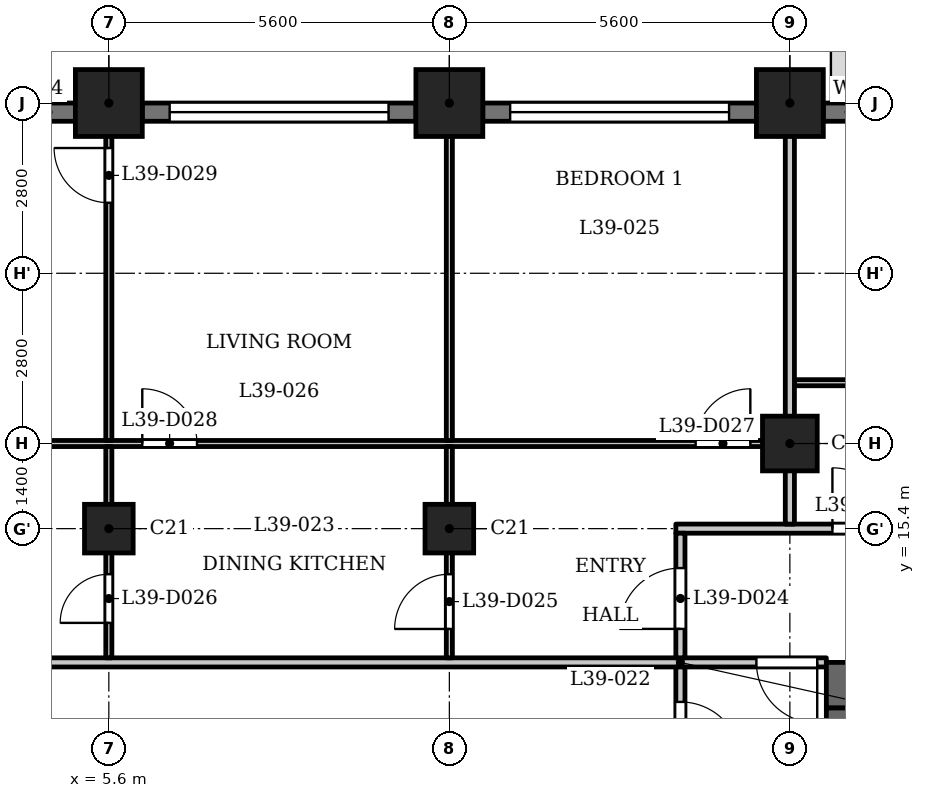
"""IFC4 building model, lengths in metres.
Left out: names, types, materials, properties, quantities, classifications, styles, units other than length and angle.
Written with IfcOpenShell. Run it as: python <this file> out.ifc"""

import sys

from ifc_helpers import new_model, si_unit, direction, frame, frame_2d, origin, origin_2d, place, context, subcontext, project, spatial, rectangle, extrude, element, fill, save


model = new_model("IFC4")
c1 = context("Model", 3, precision=1e-05, world=origin(), true_north=direction((0.0, 1.0)))
c2 = subcontext(c1, "Body", "Model", "MODEL_VIEW")
j1 = project(units=[si_unit("LENGTHUNIT", "METRE"), si_unit("PLANEANGLEUNIT", "RADIAN")], contexts=[c1])
p1 = place(None, origin())
s1 = spatial("IfcSite", under=j1, at=p1, CompositionType="ELEMENT")
p2 = place(p1, origin())
s2 = spatial("IfcBuilding", under=s1, at=p2, CompositionType="ELEMENT")
p3 = place(p2, frame((0.0, 0.0, 153.6)))
s3 = spatial("IfcBuildingStorey", under=s2, at=p3, CompositionType="ELEMENT", Elevation=153.6)
for number, where, z_axis, x_axis in (
    (1, (16.8, 22.4, 0.0), (0.0, 0.0, 1.0), (1.0, 0.0, 0.0)),
    (2, (11.2, 22.4, 0.0), (0.0, 0.0, 1.0), (1.0, 0.0, 0.0)),
    (3, (5.6, 22.4, 0.0), (0.0, 0.0, 1.0), (1.0, 0.0, 0.0)),
):
    element("IfcColumn", number, at=place(p3, frame(where, z_axis=z_axis, x_axis=x_axis)), inside=s3, PredefinedType="COLUMN", context=c2, shape_type="SweptSolid", body=[
        extrude(rectangle(XDim=1.1, YDim=1.1, at=origin_2d()), origin(), (0.0, 0.0, 1.0), 3.5),
    ])
p4 = place(p3, frame((16.8, 16.8, 0.0), z_axis=(0.0, 0.0, 1.0), x_axis=(1.0, 0.0, 0.0)))
e4 = element("IfcColumn", 4, at=p4, inside=s3, PredefinedType="COLUMN", context=c2, shape_type="SweptSolid", body=[
    extrude(rectangle(XDim=0.9, YDim=0.9, at=origin_2d()), origin(), (0.0, 0.0, 1.0), 3.5),
])
for number, where, z_axis, x_axis in (
    (5, (5.6, 15.4, 0.0), (0.0, 0.0, 1.0), (1.0, 0.0, 0.0)),
    (6, (11.2, 15.4, 0.0), (0.0, 0.0, 1.0), (1.0, 0.0, 0.0)),
):
    element("IfcColumn", number, at=place(p3, frame(where, z_axis=z_axis, x_axis=x_axis)), inside=s3, PredefinedType="COLUMN", context=c2, shape_type="SweptSolid", body=[
        extrude(rectangle(XDim=0.8, YDim=0.8, at=origin_2d()), origin(), (0.0, 0.0, 1.0), 3.5),
    ])
p5 = place(p3, frame((20.0, 22.25, 0.0), z_axis=(0.0, 0.0, 1.0), x_axis=(-1.0, 0.0, 0.0)))
e7 = element("IfcWall", 7, at=p5, inside=s3, PredefinedType="SOLIDWALL", context=c2, shape_type="SweptSolid", body=[
    extrude(rectangle(XDim=2.65, YDim=0.3, at=frame_2d((1.325, 0.0))), origin(), (0.0, 0.0, 1.0), 2.45),
])
p6 = place(p5, frame((0.425, 0.0, 0.9)))
e8 = element("IfcOpeningElement", 8, at=p6, cuts=e7, PredefinedType="OPENING", context=c2, shape_type="SweptSolid", body=[
    extrude(rectangle(XDim=1.8, YDim=1.25, at=frame_2d((0.9, 0.625))), frame((0.0, 0.16, 0.0), z_axis=(0.0, -1.0, 0.0), x_axis=(1.0, 0.0, 0.0)), (0.0, 0.0, 1.0), 0.32),
])
p7 = place(p3, frame((16.25, 22.25, 0.0), z_axis=(0.0, 0.0, 1.0), x_axis=(-1.0, 0.0, 0.0)))
e9 = element("IfcWall", 9, at=p7, inside=s3, PredefinedType="SOLIDWALL", context=c2, shape_type="SweptSolid", body=[
    extrude(rectangle(XDim=4.5, YDim=0.3, at=frame_2d((2.25, 0.0))), origin(), (0.0, 0.0, 1.0), 2.45),
])
p8 = place(p7, frame((0.45, 0.0, 1.2)))
e10 = element("IfcOpeningElement", 10, at=p8, cuts=e9, PredefinedType="OPENING", context=c2, shape_type="SweptSolid", body=[
    extrude(rectangle(XDim=3.6, YDim=0.95, at=frame_2d((1.8, 0.475))), frame((0.0, 0.16, 0.0), z_axis=(0.0, -1.0, 0.0), x_axis=(1.0, 0.0, 0.0)), (0.0, 0.0, 1.0), 0.32),
])
p9 = place(p3, frame((10.65, 22.25, 0.0), z_axis=(0.0, 0.0, 1.0), x_axis=(-1.0, 0.0, 0.0)))
e11 = element("IfcWall", 11, at=p9, inside=s3, PredefinedType="SOLIDWALL", context=c2, shape_type="SweptSolid", body=[
    extrude(rectangle(XDim=4.5, YDim=0.3, at=frame_2d((2.25, 0.0))), origin(), (0.0, 0.0, 1.0), 2.45),
])
p10 = place(p9, frame((0.45, 0.0, 1.2)))
e12 = element("IfcOpeningElement", 12, at=p10, cuts=e11, PredefinedType="OPENING", context=c2, shape_type="SweptSolid", body=[
    extrude(rectangle(XDim=3.6, YDim=0.95, at=frame_2d((1.8, 0.475))), frame((0.0, 0.16, 0.0), z_axis=(0.0, -1.0, 0.0), x_axis=(1.0, 0.0, 0.0)), (0.0, 0.0, 1.0), 0.32),
])
p11 = place(p3, frame((5.05, 22.25, 0.0), z_axis=(0.0, 0.0, 1.0), x_axis=(-1.0, 0.0, 0.0)))
e13 = element("IfcWall", 13, at=p11, inside=s3, PredefinedType="SOLIDWALL", context=c2, shape_type="SweptSolid", body=[
    extrude(rectangle(XDim=4.5, YDim=0.3, at=frame_2d((2.25, 0.0))), origin(), (0.0, 0.0, 1.0), 2.45),
])
p12 = place(p11, frame((0.45, 0.0, 1.2)))
e14 = element("IfcOpeningElement", 14, at=p12, cuts=e13, PredefinedType="OPENING", context=c2, shape_type="SweptSolid", body=[
    extrude(rectangle(XDim=3.6, YDim=0.95, at=frame_2d((1.8, 0.475))), frame((0.0, 0.16, 0.0), z_axis=(0.0, -1.0, 0.0), x_axis=(1.0, 0.0, 0.0)), (0.0, 0.0, 1.0), 0.32),
])
p13 = place(p3, frame((17.4, 12.825, 0.0), z_axis=(0.0, 0.0, 1.0), x_axis=(1.0, 0.0, 0.0)))
e15 = element("IfcWall", 15, at=p13, inside=s3, PredefinedType="SHEAR", context=c2, shape_type="SweptSolid", body=[
    extrude(rectangle(XDim=10.4, YDim=0.75, at=frame_2d((5.2, 0.0))), origin(), (0.0, 0.0, 1.0), 3.2),
])
p14 = place(p3, frame((17.6, -12.45, 0.0), z_axis=(0.0, 0.0, 1.0), x_axis=(0.0, 1.0, 0.0)))
e16 = element("IfcWall", 16, at=p14, inside=s3, PredefinedType="SHEAR", context=c2, shape_type="SweptSolid", body=[
    extrude(rectangle(XDim=24.9, YDim=0.4, at=frame_2d((12.45, 0.0))), origin(), (0.0, 0.0, 1.0), 3.2),
])
p15 = place(p14, frame((6.325, 0.0, 0.0)))
e17 = element("IfcOpeningElement", 17, at=p15, cuts=e16, PredefinedType="OPENING", context=c2, shape_type="SweptSolid", body=[
    extrude(rectangle(XDim=0.9, YDim=2.1, at=frame_2d((0.45, 1.05))), frame((0.0, 0.21, 0.0), z_axis=(0.0, -1.0, 0.0), x_axis=(1.0, 0.0, 0.0)), (0.0, 0.0, 1.0), 0.42),
])
p16 = place(p14, frame((9.925, 0.0, 0.0)))
e18 = element("IfcOpeningElement", 18, at=p16, cuts=e16, PredefinedType="OPENING", context=c2, shape_type="SweptSolid", body=[
    extrude(rectangle(XDim=0.9, YDim=2.1, at=frame_2d((0.45, 1.05))), frame((0.0, 0.21, 0.0), z_axis=(0.0, -1.0, 0.0), x_axis=(1.0, 0.0, 0.0)), (0.0, 0.0, 1.0), 0.42),
])
p17 = place(p14, frame((15.6, 0.0, 0.0)))
e19 = element("IfcOpeningElement", 19, at=p17, cuts=e16, PredefinedType="OPENING", context=c2, shape_type="SweptSolid", body=[
    extrude(rectangle(XDim=1.1, YDim=2.1, at=frame_2d((0.55, 1.05))), frame((0.0, 0.21, 0.0), z_axis=(0.0, -1.0, 0.0), x_axis=(1.0, 0.0, 0.0)), (0.0, 0.0, 1.0), 0.42),
])
p18 = place(p14, frame((18.0, 0.0, 0.0)))
e20 = element("IfcOpeningElement", 20, at=p18, cuts=e16, PredefinedType="OPENING", context=c2, shape_type="SweptSolid", body=[
    extrude(rectangle(XDim=1.1, YDim=2.1, at=frame_2d((0.55, 1.05))), frame((0.0, 0.21, 0.0), z_axis=(0.0, -1.0, 0.0), x_axis=(1.0, 0.0, 0.0)), (0.0, 0.0, 1.0), 0.42),
])
p19 = place(p14, frame((23.025, 0.0, 0.0)))
e21 = element("IfcOpeningElement", 21, at=p19, cuts=e16, PredefinedType="OPENING", context=c2, shape_type="SweptSolid", body=[
    extrude(rectangle(XDim=1.1, YDim=2.1, at=frame_2d((0.55, 1.05))), frame((0.0, 0.21, 0.0), z_axis=(0.0, -1.0, 0.0), x_axis=(1.0, 0.0, 0.0)), (0.0, 0.0, 1.0), 0.42),
])
p20 = place(p14, frame((0.775, 0.0, 0.0)))
e22 = element("IfcOpeningElement", 22, at=p20, cuts=e16, PredefinedType="OPENING", context=c2, shape_type="SweptSolid", body=[
    extrude(rectangle(XDim=1.1, YDim=2.1, at=frame_2d((0.55, 1.05))), frame((0.0, 0.21, 0.0), z_axis=(0.0, -1.0, 0.0), x_axis=(1.0, 0.0, 0.0)), (0.0, 0.0, 1.0), 0.42),
])
p21 = place(p14, frame((12.925, 0.0, 0.0)))
e23 = element("IfcOpeningElement", 23, at=p21, cuts=e16, PredefinedType="OPENING", context=c2, shape_type="SweptSolid", body=[
    extrude(rectangle(XDim=1.8, YDim=2.1, at=frame_2d((0.9, 1.05))), frame((0.0, 0.21, 0.0), z_axis=(0.0, -1.0, 0.0), x_axis=(1.0, 0.0, 0.0)), (0.0, 0.0, 1.0), 0.42),
])
p22 = place(p3, frame((-17.4, 13.2, 0.0), z_axis=(0.0, 0.0, 1.0), x_axis=(1.0, 0.0, 0.0)))
e24 = element("IfcWall", 24, at=p22, inside=s3, PredefinedType="PARTITIONING", context=c2, shape_type="SweptSolid", body=[
    extrude(rectangle(XDim=34.8, YDim=0.15, at=frame_2d((17.4, 0.0))), origin(), (0.0, 0.0, 1.0), 3.2),
])
p23 = place(p22, frame((0.25, 0.0, 0.0)))
e25 = element("IfcOpeningElement", 25, at=p23, cuts=e24, PredefinedType="OPENING", context=c2, shape_type="SweptSolid", body=[
    extrude(rectangle(XDim=1.0, YDim=2.1, at=frame_2d((0.5, 1.05))), frame((0.0, 0.085, 0.0), z_axis=(0.0, -1.0, 0.0), x_axis=(1.0, 0.0, 0.0)), (0.0, 0.0, 1.0), 0.17),
])
p24 = place(p22, frame((33.65, 0.0, 0.0)))
e26 = element("IfcOpeningElement", 26, at=p24, cuts=e24, PredefinedType="OPENING", context=c2, shape_type="SweptSolid", body=[
    extrude(rectangle(XDim=1.0, YDim=2.1, at=frame_2d((0.5, 1.05))), frame((0.0, 0.085, 0.0), z_axis=(0.0, -1.0, 0.0), x_axis=(1.0, 0.0, 0.0)), (0.0, 0.0, 1.0), 0.17),
])
p25 = place(p22, frame((13.75, 0.0, 0.0)))
e27 = element("IfcOpeningElement", 27, at=p25, cuts=e24, PredefinedType="OPENING", context=c2, shape_type="SweptSolid", body=[
    extrude(rectangle(XDim=1.0, YDim=2.1, at=frame_2d((0.5, 1.05))), frame((0.0, 0.085, 0.0), z_axis=(0.0, -1.0, 0.0), x_axis=(1.0, 0.0, 0.0)), (0.0, 0.0, 1.0), 0.17),
])
p26 = place(p3, frame((14.925, 15.4, 0.0), z_axis=(0.0, 0.0, 1.0), x_axis=(1.0, 0.0, 0.0)))
e28 = element("IfcWall", 28, at=p26, inside=s3, PredefinedType="PARTITIONING", context=c2, shape_type="SweptSolid", body=[
    extrude(rectangle(XDim=12.559, YDim=0.15, at=frame_2d((6.279, 0.0))), origin(), (0.0, 0.0, 1.0), 3.2),
])
p27 = place(p26, frame((2.575, 0.0, 0.0)))
e29 = element("IfcOpeningElement", 29, at=p27, cuts=e28, PredefinedType="OPENING", context=c2, shape_type="SweptSolid", body=[
    extrude(rectangle(XDim=1.0, YDim=2.1, at=frame_2d((0.5, 1.05))), frame((0.0, 0.085, 0.0), z_axis=(0.0, -1.0, 0.0), x_axis=(1.0, 0.0, 0.0)), (0.0, 0.0, 1.0), 0.17),
])
p28 = place(p3, frame((-16.725, 16.8, 0.0), z_axis=(0.0, 0.0, 1.0), x_axis=(1.0, 0.0, 0.0)))
e30 = element("IfcWall", 30, at=p28, inside=s3, PredefinedType="PARTITIONING", context=c2, shape_type="SweptSolid", body=[
    extrude(rectangle(XDim=33.45, YDim=0.1, at=frame_2d((16.725, 0.0))), origin(), (0.0, 0.0, 1.0), 3.2),
])
p29 = place(p28, frame((9.575, 0.0, 0.0)))
e31 = element("IfcOpeningElement", 31, at=p29, cuts=e30, PredefinedType="OPENING", context=c2, shape_type="SweptSolid", body=[
    extrude(rectangle(XDim=0.8, YDim=2.1, at=frame_2d((0.4, 1.05))), frame((0.0, 0.06, 0.0), z_axis=(0.0, -1.0, 0.0), x_axis=(1.0, 0.0, 0.0)), (0.0, 0.0, 1.0), 0.12),
])
p30 = place(p28, frame((6.125, 0.0, 0.0)))
e32 = element("IfcOpeningElement", 32, at=p30, cuts=e30, PredefinedType="OPENING", context=c2, shape_type="SweptSolid", body=[
    extrude(rectangle(XDim=0.9, YDim=2.1, at=frame_2d((0.45, 1.05))), frame((0.0, 0.06, 0.0), z_axis=(0.0, -1.0, 0.0), x_axis=(1.0, 0.0, 0.0)), (0.0, 0.0, 1.0), 0.12),
])
p31 = place(p28, frame((0.975, 0.0, 0.0)))
e33 = element("IfcOpeningElement", 33, at=p31, cuts=e30, PredefinedType="OPENING", context=c2, shape_type="SweptSolid", body=[
    extrude(rectangle(XDim=0.9, YDim=2.1, at=frame_2d((0.45, 1.05))), frame((0.0, 0.06, 0.0), z_axis=(0.0, -1.0, 0.0), x_axis=(1.0, 0.0, 0.0)), (0.0, 0.0, 1.0), 0.12),
])
p32 = place(p28, frame((3.225, 0.0, 0.0)))
e34 = element("IfcOpeningElement", 34, at=p32, cuts=e30, PredefinedType="OPENING", context=c2, shape_type="SweptSolid", body=[
    extrude(rectangle(XDim=0.9, YDim=2.1, at=frame_2d((0.45, 1.05))), frame((0.0, 0.06, 0.0), z_axis=(0.0, -1.0, 0.0), x_axis=(1.0, 0.0, 0.0)), (0.0, 0.0, 1.0), 0.12),
])
p33 = place(p28, frame((15.375, 0.0, 0.0)))
e35 = element("IfcOpeningElement", 35, at=p33, cuts=e30, PredefinedType="OPENING", context=c2, shape_type="SweptSolid", body=[
    extrude(rectangle(XDim=0.8, YDim=2.1, at=frame_2d((0.4, 1.05))), frame((0.0, 0.06, 0.0), z_axis=(0.0, -1.0, 0.0), x_axis=(1.0, 0.0, 0.0)), (0.0, 0.0, 1.0), 0.12),
])
p34 = place(p28, frame((13.175, 0.0, 0.0)))
e36 = element("IfcOpeningElement", 36, at=p34, cuts=e30, PredefinedType="OPENING", context=c2, shape_type="SweptSolid", body=[
    extrude(rectangle(XDim=0.9, YDim=2.1, at=frame_2d((0.45, 1.05))), frame((0.0, 0.06, 0.0), z_axis=(0.0, -1.0, 0.0), x_axis=(1.0, 0.0, 0.0)), (0.0, 0.0, 1.0), 0.12),
])
p35 = place(p28, frame((31.975, 0.0, 0.0)))
e37 = element("IfcOpeningElement", 37, at=p35, cuts=e30, PredefinedType="OPENING", context=c2, shape_type="SweptSolid", body=[
    extrude(rectangle(XDim=0.9, YDim=2.1, at=frame_2d((0.45, 1.05))), frame((0.0, 0.06, 0.0), z_axis=(0.0, -1.0, 0.0), x_axis=(1.0, 0.0, 0.0)), (0.0, 0.0, 1.0), 0.12),
])
p36 = place(p28, frame((22.875, 0.0, 0.0)))
e38 = element("IfcOpeningElement", 38, at=p36, cuts=e30, PredefinedType="OPENING", context=c2, shape_type="SweptSolid", body=[
    extrude(rectangle(XDim=0.9, YDim=2.1, at=frame_2d((0.45, 1.05))), frame((0.0, 0.06, 0.0), z_axis=(0.0, -1.0, 0.0), x_axis=(1.0, 0.0, 0.0)), (0.0, 0.0, 1.0), 0.12),
])
p37 = place(p3, frame((16.875, 17.8, 0.0), z_axis=(0.0, 0.0, 1.0), x_axis=(1.0, 0.0, 0.0)))
e39 = element("IfcWall", 39, at=p37, inside=s3, PredefinedType="PARTITIONING", context=c2, shape_type="SweptSolid", body=[
    extrude(rectangle(XDim=9.519, YDim=0.1, at=frame_2d((4.76, 0.0))), origin(), (0.0, 0.0, 1.0), 3.2),
])
p38 = place(p37, frame((6.175, 0.0, 0.0)))
e40 = element("IfcOpeningElement", 40, at=p38, cuts=e39, PredefinedType="OPENING", context=c2, shape_type="SweptSolid", body=[
    extrude(rectangle(XDim=0.8, YDim=2.1, at=frame_2d((0.4, 1.05))), frame((0.0, 0.06, 0.0), z_axis=(0.0, -1.0, 0.0), x_axis=(1.0, 0.0, 0.0)), (0.0, 0.0, 1.0), 0.12),
])
p39 = place(p37, frame((1.725, 0.0, 0.0)))
e41 = element("IfcOpeningElement", 41, at=p39, cuts=e39, PredefinedType="OPENING", context=c2, shape_type="SweptSolid", body=[
    extrude(rectangle(XDim=0.9, YDim=2.1, at=frame_2d((0.45, 1.05))), frame((0.0, 0.06, 0.0), z_axis=(0.0, -1.0, 0.0), x_axis=(1.0, 0.0, 0.0)), (0.0, 0.0, 1.0), 0.12),
])
p40 = place(p3, frame((5.6, 13.275, 0.0), z_axis=(0.0, 0.0, 1.0), x_axis=(0.0, 1.0, 0.0)))
e42 = element("IfcWall", 42, at=p40, inside=s3, PredefinedType="PARTITIONING", context=c2, shape_type="SweptSolid", body=[
    extrude(rectangle(XDim=3.475, YDim=0.1, at=frame_2d((1.738, 0.0))), origin(), (0.0, 0.0, 1.0), 3.2),
])
p41 = place(p40, frame((0.575, 0.0, 0.0)))
e43 = element("IfcOpeningElement", 43, at=p41, cuts=e42, PredefinedType="OPENING", context=c2, shape_type="SweptSolid", body=[
    extrude(rectangle(XDim=0.8, YDim=2.1, at=frame_2d((0.4, 1.05))), frame((0.0, 0.06, 0.0), z_axis=(0.0, -1.0, 0.0), x_axis=(1.0, 0.0, 0.0)), (0.0, 0.0, 1.0), 0.12),
])
p42 = place(p3, frame((5.6, 16.85, 0.0), z_axis=(0.0, 0.0, 1.0), x_axis=(0.0, 1.0, 0.0)))
e44 = element("IfcWall", 44, at=p42, inside=s3, PredefinedType="PARTITIONING", context=c2, shape_type="SweptSolid", body=[
    extrude(rectangle(XDim=6.08, YDim=0.1, at=frame_2d((3.04, 0.0))), origin(), (0.0, 0.0, 1.0), 3.2),
])
p43 = place(p42, frame((3.91, 0.0, 0.0)))
e45 = element("IfcOpeningElement", 45, at=p43, cuts=e44, PredefinedType="OPENING", context=c2, shape_type="SweptSolid", body=[
    extrude(rectangle(XDim=0.9, YDim=2.1, at=frame_2d((0.45, 1.05))), frame((0.0, 0.06, 0.0), z_axis=(0.0, -1.0, 0.0), x_axis=(1.0, 0.0, 0.0)), (0.0, 0.0, 1.0), 0.12),
])
p44 = place(p3, frame((11.2, 13.275, 0.0), z_axis=(0.0, 0.0, 1.0), x_axis=(0.0, 1.0, 0.0)))
e46 = element("IfcWall", 46, at=p44, inside=s3, PredefinedType="PARTITIONING", context=c2, shape_type="SweptSolid", body=[
    extrude(rectangle(XDim=3.475, YDim=0.1, at=frame_2d((1.738, 0.0))), origin(), (0.0, 0.0, 1.0), 3.2),
])
p45 = place(p44, frame((0.475, 0.0, 0.0)))
e47 = element("IfcOpeningElement", 47, at=p45, cuts=e46, PredefinedType="OPENING", context=c2, shape_type="SweptSolid", body=[
    extrude(rectangle(XDim=0.9, YDim=2.1, at=frame_2d((0.45, 1.05))), frame((0.0, 0.06, 0.0), z_axis=(0.0, -1.0, 0.0), x_axis=(1.0, 0.0, 0.0)), (0.0, 0.0, 1.0), 0.12),
])
p46 = place(p3, frame((11.2, 16.85, 0.0), z_axis=(0.0, 0.0, 1.0), x_axis=(0.0, 1.0, 0.0)))
e48 = element("IfcWall", 48, at=p46, inside=s3, PredefinedType="PARTITIONING", context=c2, shape_type="SweptSolid", body=[
    extrude(rectangle(XDim=6.08, YDim=0.1, at=frame_2d((3.04, 0.0))), origin(), (0.0, 0.0, 1.0), 3.2),
])
p47 = place(p3, frame((15.0, 6.769, 0.0), z_axis=(0.0, 0.0, 1.0), x_axis=(0.0, 1.0, 0.0)))
e49 = element("IfcWall", 49, at=p47, inside=s3, PredefinedType="PARTITIONING", context=c2, shape_type="SweptSolid", body=[
    extrude(rectangle(XDim=6.356, YDim=0.15, at=frame_2d((3.178, 0.0))), origin(), (0.0, 0.0, 1.0), 3.2),
])
p48 = place(p47, frame((4.781, 0.0, 0.0)))
e50 = element("IfcOpeningElement", 50, at=p48, cuts=e49, PredefinedType="OPENING", context=c2, shape_type="SweptSolid", body=[
    extrude(rectangle(XDim=1.0, YDim=2.1, at=frame_2d((0.5, 1.05))), frame((0.0, 0.085, 0.0), z_axis=(0.0, -1.0, 0.0), x_axis=(1.0, 0.0, 0.0)), (0.0, 0.0, 1.0), 0.17),
])
p49 = place(p3, frame((15.0, 13.275, 0.0), z_axis=(0.0, 0.0, 1.0), x_axis=(0.0, 1.0, 0.0)))
e51 = element("IfcWall", 51, at=p49, inside=s3, PredefinedType="PARTITIONING", context=c2, shape_type="SweptSolid", body=[
    extrude(rectangle(XDim=2.05, YDim=0.15, at=frame_2d((1.025, 0.0))), origin(), (0.0, 0.0, 1.0), 3.2),
])
p50 = place(p49, frame((0.476, 0.0, 0.0)))
e52 = element("IfcOpeningElement", 52, at=p50, cuts=e51, PredefinedType="OPENING", context=c2, shape_type="SweptSolid", body=[
    extrude(rectangle(XDim=1.0, YDim=2.1, at=frame_2d((0.5, 1.05))), frame((0.0, 0.085, 0.0), z_axis=(0.0, -1.0, 0.0), x_axis=(1.0, 0.0, 0.0)), (0.0, 0.0, 1.0), 0.17),
])
p51 = place(p3, frame((16.8, 15.475, 0.0), z_axis=(0.0, 0.0, 1.0), x_axis=(0.0, 1.0, 0.0)))
e53 = element("IfcWall", 53, at=p51, inside=s3, PredefinedType="PARTITIONING", context=c2, shape_type="SweptSolid", body=[
    extrude(rectangle(XDim=7.455, YDim=0.15, at=frame_2d((3.728, 0.0))), origin(), (0.0, 0.0, 1.0), 3.2),
])
p52 = place(p48, origin())
e54 = element("IfcDoor", 54, at=p52, inside=s3, OperationType="SINGLE_SWING_LEFT", PredefinedType="DOOR", context=c2, shape_type="SweptSolid", body=[
    extrude(rectangle(XDim=1.0, YDim=2.1, at=frame_2d((0.5, 1.05))), frame((0.0, 0.025, 0.0), z_axis=(0.0, -1.0, 0.0), x_axis=(1.0, 0.0, 0.0)), (0.0, 0.0, 1.0), 0.05),
])
fill(e50, e54)
p53 = place(p24, origin())
e55 = element("IfcDoor", 55, at=p53, inside=s3, OperationType="SINGLE_SWING_RIGHT", PredefinedType="DOOR", context=c2, shape_type="SweptSolid", body=[
    extrude(rectangle(XDim=1.0, YDim=2.1, at=frame_2d((0.5, 1.05))), frame((0.0, 0.025, 0.0), z_axis=(0.0, -1.0, 0.0), x_axis=(1.0, 0.0, 0.0)), (0.0, 0.0, 1.0), 0.05),
])
fill(e26, e55)
p54 = place(p50, origin())
e56 = element("IfcDoor", 56, at=p54, inside=s3, OperationType="SINGLE_SWING_RIGHT", PredefinedType="DOOR", context=c2, shape_type="SweptSolid", body=[
    extrude(rectangle(XDim=1.0, YDim=2.1, at=frame_2d((0.5, 1.05))), frame((0.0, 0.025, 0.0), z_axis=(0.0, -1.0, 0.0), x_axis=(1.0, 0.0, 0.0)), (0.0, 0.0, 1.0), 0.05),
])
fill(e52, e56)
p55 = place(p45, origin())
e57 = element("IfcDoor", 57, at=p55, inside=s3, OperationType="SINGLE_SWING_RIGHT", PredefinedType="DOOR", context=c2, shape_type="SweptSolid", body=[
    extrude(rectangle(XDim=0.9, YDim=2.1, at=frame_2d((0.45, 1.05))), frame((0.0, 0.025, 0.0), z_axis=(0.0, -1.0, 0.0), x_axis=(1.0, 0.0, 0.0)), (0.0, 0.0, 1.0), 0.05),
])
fill(e47, e57)
p56 = place(p41, origin())
e58 = element("IfcDoor", 58, at=p56, inside=s3, OperationType="SINGLE_SWING_RIGHT", PredefinedType="DOOR", context=c2, shape_type="SweptSolid", body=[
    extrude(rectangle(XDim=0.8, YDim=2.1, at=frame_2d((0.4, 1.05))), frame((0.0, 0.025, 0.0), z_axis=(0.0, -1.0, 0.0), x_axis=(1.0, 0.0, 0.0)), (0.0, 0.0, 1.0), 0.05),
])
fill(e43, e58)
p57 = place(p35, origin())
e59 = element("IfcDoor", 59, at=p57, inside=s3, OperationType="SINGLE_SWING_LEFT", PredefinedType="DOOR", context=c2, shape_type="SweptSolid", body=[
    extrude(rectangle(XDim=0.9, YDim=2.1, at=frame_2d((0.45, 1.05))), frame((0.0, 0.025, 0.0), z_axis=(0.0, -1.0, 0.0), x_axis=(1.0, 0.0, 0.0)), (0.0, 0.0, 1.0), 0.05),
])
fill(e37, e59)
p58 = place(p36, origin())
e60 = element("IfcDoor", 60, at=p58, inside=s3, OperationType="SINGLE_SWING_RIGHT", PredefinedType="DOOR", context=c2, shape_type="SweptSolid", body=[
    extrude(rectangle(XDim=0.9, YDim=2.1, at=frame_2d((0.45, 1.05))), frame((0.0, 0.025, 0.0), z_axis=(0.0, -1.0, 0.0), x_axis=(1.0, 0.0, 0.0)), (0.0, 0.0, 1.0), 0.05),
])
fill(e38, e60)
p59 = place(p43, origin())
e61 = element("IfcDoor", 61, at=p59, inside=s3, OperationType="SINGLE_SWING_LEFT", PredefinedType="DOOR", context=c2, shape_type="SweptSolid", body=[
    extrude(rectangle(XDim=0.9, YDim=2.1, at=frame_2d((0.45, 1.05))), frame((0.0, 0.025, 0.0), z_axis=(0.0, -1.0, 0.0), x_axis=(1.0, 0.0, 0.0)), (0.0, 0.0, 1.0), 0.05),
])
fill(e45, e61)
p60 = place(p27, origin())
e62 = element("IfcDoor", 62, at=p60, inside=s3, OperationType="SINGLE_SWING_RIGHT", PredefinedType="DOOR", context=c2, shape_type="SweptSolid", body=[
    extrude(rectangle(XDim=1.0, YDim=2.1, at=frame_2d((0.5, 1.05))), frame((0.0, 0.025, 0.0), z_axis=(0.0, -1.0, 0.0), x_axis=(1.0, 0.0, 0.0)), (0.0, 0.0, 1.0), 0.05),
])
fill(e29, e62)
p61 = place(p8, origin())
e63 = element("IfcWindow", 63, at=p61, inside=s3, PartitioningType="SINGLE_PANEL", PredefinedType="WINDOW", context=c2, shape_type="SweptSolid", body=[
    extrude(rectangle(XDim=3.6, YDim=0.95, at=frame_2d((1.8, 0.475))), frame((0.0, 0.03, 0.0), z_axis=(0.0, -1.0, 0.0), x_axis=(1.0, 0.0, 0.0)), (0.0, 0.0, 1.0), 0.06),
])
fill(e10, e63)
p62 = place(p10, origin())
e64 = element("IfcWindow", 64, at=p62, inside=s3, PartitioningType="SINGLE_PANEL", PredefinedType="WINDOW", context=c2, shape_type="SweptSolid", body=[
    extrude(rectangle(XDim=3.6, YDim=0.95, at=frame_2d((1.8, 0.475))), frame((0.0, 0.03, 0.0), z_axis=(0.0, -1.0, 0.0), x_axis=(1.0, 0.0, 0.0)), (0.0, 0.0, 1.0), 0.06),
])
fill(e12, e64)
save(model, sys.argv[1])
